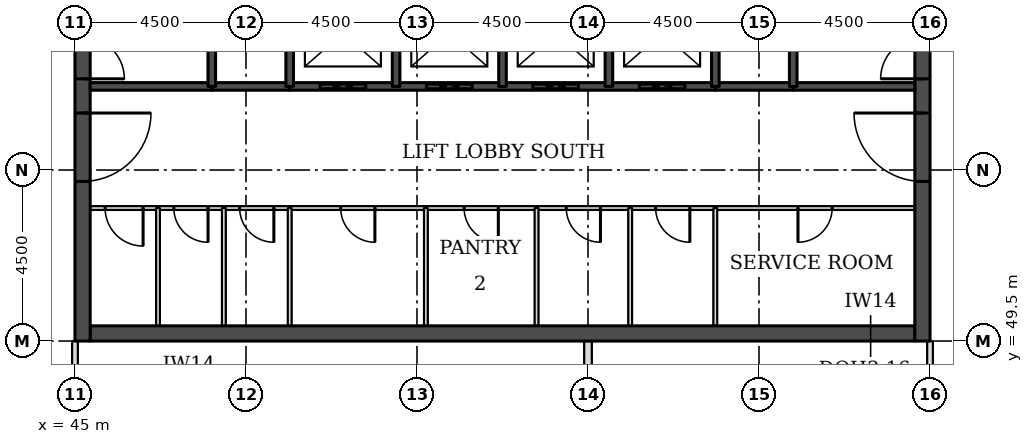
"""IFC4 building model, lengths in metres.
Left out: names, types, materials, properties, quantities, classifications, styles, units other than length and angle.
Written with IfcOpenShell. Run it as: python <this file> out.ifc"""

import sys

from ifc_helpers import new_model, si_unit, direction, frame, frame_2d, origin, place, context, subcontext, project, spatial, rectangle, extrude, element, fill, save


model = new_model("IFC4")
c1 = context("Model", 3, precision=1e-05, world=origin(), true_north=direction((0.0, 1.0)))
c2 = subcontext(c1, "Body", "Model", "MODEL_VIEW")
j1 = project(units=[si_unit("LENGTHUNIT", "METRE"), si_unit("PLANEANGLEUNIT", "RADIAN")], contexts=[c1])
p1 = place(None, origin())
s1 = spatial("IfcSite", under=j1, at=p1, CompositionType="ELEMENT")
p2 = place(p1, origin())
s2 = spatial("IfcBuilding", under=s1, at=p2, CompositionType="ELEMENT")
p3 = place(p2, frame((0.0, 0.0, 166.2)))
s3 = spatial("IfcBuildingStorey", under=s2, at=p3, CompositionType="ELEMENT", Elevation=166.2)
p4 = place(p3, frame((45.4, 49.7, 0.0), z_axis=(0.0, 0.0, 1.0), x_axis=(1.0, 0.0, 0.0)))
e1 = element("IfcWall", 1, at=p4, inside=s3, PredefinedType="SHEAR", context=c2, shape_type="SweptSolid", body=[
    extrude(rectangle(XDim=21.7, YDim=0.4, at=frame_2d((10.85, 0.0))), origin(), (0.0, 0.0, 1.0), 3.7),
])
p5 = place(p3, frame((45.2, 49.5, 0.0), z_axis=(0.0, 0.0, 1.0), x_axis=(0.0, 1.0, 0.0)))
e2 = element("IfcWall", 2, at=p5, inside=s3, PredefinedType="SHEAR", context=c2, shape_type="SweptSolid", body=[
    extrude(rectangle(XDim=22.5, YDim=0.4, at=frame_2d((11.25, 0.0))), origin(), (0.0, 0.0, 1.0), 3.7),
])
p6 = place(p5, frame((4.2, 0.0, 0.0)))
e3 = element("IfcOpeningElement", 3, at=p6, cuts=e2, PredefinedType="OPENING", context=c2, shape_type="SweptSolid", body=[
    extrude(rectangle(XDim=1.8, YDim=2.1, at=frame_2d((0.9, 1.05))), frame((0.0, 0.21, 0.0), z_axis=(0.0, -1.0, 0.0), x_axis=(1.0, 0.0, 0.0)), (0.0, 0.0, 1.0), 0.42),
])
p7 = place(p5, frame((6.9, 0.0, 0.0)))
e4 = element("IfcOpeningElement", 4, at=p7, cuts=e2, PredefinedType="OPENING", context=c2, shape_type="SweptSolid", body=[
    extrude(rectangle(XDim=1.1, YDim=2.1, at=frame_2d((0.55, 1.05))), frame((0.0, 0.21, 0.0), z_axis=(0.0, -1.0, 0.0), x_axis=(1.0, 0.0, 0.0)), (0.0, 0.0, 1.0), 0.42),
])
p8 = place(p5, frame((13.6, 0.0, 0.0)))
e5 = element("IfcOpeningElement", 5, at=p8, cuts=e2, PredefinedType="OPENING", context=c2, shape_type="SweptSolid", body=[
    extrude(rectangle(XDim=1.1, YDim=2.1, at=frame_2d((0.55, 1.05))), frame((0.0, 0.21, 0.0), z_axis=(0.0, -1.0, 0.0), x_axis=(1.0, 0.0, 0.0)), (0.0, 0.0, 1.0), 0.42),
])
p9 = place(p5, frame((16.5, 0.0, 0.0)))
e6 = element("IfcOpeningElement", 6, at=p9, cuts=e2, PredefinedType="OPENING", context=c2, shape_type="SweptSolid", body=[
    extrude(rectangle(XDim=1.8, YDim=2.1, at=frame_2d((0.9, 1.05))), frame((0.0, 0.21, 0.0), z_axis=(0.0, -1.0, 0.0), x_axis=(1.0, 0.0, 0.0)), (0.0, 0.0, 1.0), 0.42),
])
p10 = place(p3, frame((67.3, 49.5, 0.0), z_axis=(0.0, 0.0, 1.0), x_axis=(0.0, 1.0, 0.0)))
e7 = element("IfcWall", 7, at=p10, inside=s3, PredefinedType="SHEAR", context=c2, shape_type="SweptSolid", body=[
    extrude(rectangle(XDim=22.5, YDim=0.4, at=frame_2d((11.25, 0.0))), origin(), (0.0, 0.0, 1.0), 3.7),
])
p11 = place(p10, frame((4.2, 0.0, 0.0)))
e8 = element("IfcOpeningElement", 8, at=p11, cuts=e7, PredefinedType="OPENING", context=c2, shape_type="SweptSolid", body=[
    extrude(rectangle(XDim=1.8, YDim=2.1, at=frame_2d((0.9, 1.05))), frame((0.0, 0.21, 0.0), z_axis=(0.0, -1.0, 0.0), x_axis=(1.0, 0.0, 0.0)), (0.0, 0.0, 1.0), 0.42),
])
p12 = place(p10, frame((6.9, 0.0, 0.0)))
e9 = element("IfcOpeningElement", 9, at=p12, cuts=e7, PredefinedType="OPENING", context=c2, shape_type="SweptSolid", body=[
    extrude(rectangle(XDim=1.1, YDim=2.1, at=frame_2d((0.55, 1.05))), frame((0.0, 0.21, 0.0), z_axis=(0.0, -1.0, 0.0), x_axis=(1.0, 0.0, 0.0)), (0.0, 0.0, 1.0), 0.42),
])
p13 = place(p10, frame((13.6, 0.0, 0.0)))
e10 = element("IfcOpeningElement", 10, at=p13, cuts=e7, PredefinedType="OPENING", context=c2, shape_type="SweptSolid", body=[
    extrude(rectangle(XDim=1.1, YDim=2.1, at=frame_2d((0.55, 1.05))), frame((0.0, 0.21, 0.0), z_axis=(0.0, -1.0, 0.0), x_axis=(1.0, 0.0, 0.0)), (0.0, 0.0, 1.0), 0.42),
])
p14 = place(p10, frame((16.5, 0.0, 0.0)))
e11 = element("IfcOpeningElement", 11, at=p14, cuts=e7, PredefinedType="OPENING", context=c2, shape_type="SweptSolid", body=[
    extrude(rectangle(XDim=1.8, YDim=2.1, at=frame_2d((0.9, 1.05))), frame((0.0, 0.21, 0.0), z_axis=(0.0, -1.0, 0.0), x_axis=(1.0, 0.0, 0.0)), (0.0, 0.0, 1.0), 0.42),
])
p15 = place(p3, frame((58.5, 45.0, 0.0), z_axis=(0.0, 0.0, 1.0), x_axis=(0.0, 1.0, 0.0)))
e12 = element("IfcWall", 12, at=p15, inside=s3, PredefinedType="PARTITIONING", context=c2, shape_type="SweptSolid", body=[
    extrude(rectangle(XDim=4.5, YDim=0.2, at=frame_2d((2.25, 0.0))), origin(), (0.0, 0.0, 1.0), 3.55),
])
for number, where, z_axis, x_axis in (
    (13, (45.0, 48.0, 0.0), (0.0, 0.0, 1.0), (0.0, 1.0, 0.0)),
    (14, (67.5, 48.0, 0.0), (0.0, 0.0, 1.0), (0.0, 1.0, 0.0)),
):
    element("IfcWall", number, at=place(p3, frame(where, z_axis=z_axis, x_axis=x_axis)), inside=s3, PredefinedType="PARTITIONING", context=c2, shape_type="SweptSolid", body=[
        extrude(rectangle(XDim=1.5, YDim=0.15, at=frame_2d((0.75, 0.0))), origin(), (0.0, 0.0, 1.0), 3.022),
    ])
p16 = place(p3, frame((45.4, 53.0, 0.0), z_axis=(0.0, 0.0, 1.0), x_axis=(1.0, 0.0, 0.0)))
e15 = element("IfcWall", 15, at=p16, inside=s3, PredefinedType="PARTITIONING", context=c2, shape_type="SweptSolid", body=[
    extrude(rectangle(XDim=21.7, YDim=0.1, at=frame_2d((10.85, 0.0))), origin(), (0.0, 0.0, 1.0), 3.55),
])
p17 = place(p16, frame((18.625, 0.0, 0.0)))
e16 = element("IfcOpeningElement", 16, at=p17, cuts=e15, PredefinedType="OPENING", context=c2, shape_type="SweptSolid", body=[
    extrude(rectangle(XDim=0.9, YDim=2.1, at=frame_2d((0.45, 1.05))), frame((0.0, 0.06, 0.0), z_axis=(0.0, -1.0, 0.0), x_axis=(1.0, 0.0, 0.0)), (0.0, 0.0, 1.0), 0.12),
])
p18 = place(p16, frame((0.393, 0.0, 0.0)))
e17 = element("IfcOpeningElement", 17, at=p18, cuts=e15, PredefinedType="OPENING", context=c2, shape_type="SweptSolid", body=[
    extrude(rectangle(XDim=1.0, YDim=2.1, at=frame_2d((0.5, 1.05))), frame((0.0, 0.06, 0.0), z_axis=(0.0, -1.0, 0.0), x_axis=(1.0, 0.0, 0.0)), (0.0, 0.0, 1.0), 0.12),
])
p19 = place(p16, frame((2.201, 0.0, 0.0)))
e18 = element("IfcOpeningElement", 18, at=p19, cuts=e15, PredefinedType="OPENING", context=c2, shape_type="SweptSolid", body=[
    extrude(rectangle(XDim=0.9, YDim=2.1, at=frame_2d((0.45, 1.05))), frame((0.0, 0.06, 0.0), z_axis=(0.0, -1.0, 0.0), x_axis=(1.0, 0.0, 0.0)), (0.0, 0.0, 1.0), 0.12),
])
p20 = place(p16, frame((3.934, 0.0, 0.0)))
e19 = element("IfcOpeningElement", 19, at=p20, cuts=e15, PredefinedType="OPENING", context=c2, shape_type="SweptSolid", body=[
    extrude(rectangle(XDim=0.9, YDim=2.1, at=frame_2d((0.45, 1.05))), frame((0.0, 0.06, 0.0), z_axis=(0.0, -1.0, 0.0), x_axis=(1.0, 0.0, 0.0)), (0.0, 0.0, 1.0), 0.12),
])
p21 = place(p16, frame((6.592, 0.0, 0.0)))
e20 = element("IfcOpeningElement", 20, at=p21, cuts=e15, PredefinedType="OPENING", context=c2, shape_type="SweptSolid", body=[
    extrude(rectangle(XDim=0.9, YDim=2.1, at=frame_2d((0.45, 1.05))), frame((0.0, 0.06, 0.0), z_axis=(0.0, -1.0, 0.0), x_axis=(1.0, 0.0, 0.0)), (0.0, 0.0, 1.0), 0.12),
])
p22 = place(p16, frame((9.84, 0.0, 0.0)))
e21 = element("IfcOpeningElement", 21, at=p22, cuts=e15, PredefinedType="OPENING", context=c2, shape_type="SweptSolid", body=[
    extrude(rectangle(XDim=0.9, YDim=2.1, at=frame_2d((0.45, 1.05))), frame((0.0, 0.06, 0.0), z_axis=(0.0, -1.0, 0.0), x_axis=(1.0, 0.0, 0.0)), (0.0, 0.0, 1.0), 0.12),
])
p23 = place(p16, frame((12.528, 0.0, 0.0)))
e22 = element("IfcOpeningElement", 22, at=p23, cuts=e15, PredefinedType="OPENING", context=c2, shape_type="SweptSolid", body=[
    extrude(rectangle(XDim=0.9, YDim=2.1, at=frame_2d((0.45, 1.05))), frame((0.0, 0.06, 0.0), z_axis=(0.0, -1.0, 0.0), x_axis=(1.0, 0.0, 0.0)), (0.0, 0.0, 1.0), 0.12),
])
p24 = place(p16, frame((14.88, 0.0, 0.0)))
e23 = element("IfcOpeningElement", 23, at=p24, cuts=e15, PredefinedType="OPENING", context=c2, shape_type="SweptSolid", body=[
    extrude(rectangle(XDim=0.9, YDim=2.1, at=frame_2d((0.45, 1.05))), frame((0.0, 0.06, 0.0), z_axis=(0.0, -1.0, 0.0), x_axis=(1.0, 0.0, 0.0)), (0.0, 0.0, 1.0), 0.12),
])
for number, where, z_axis, x_axis in (
    (24, (48.6, 56.2, 0.0), (0.0, 0.0, 1.0), (1.0, 0.0, 0.0)),
    (25, (61.85, 56.2, 0.0), (0.0, 0.0, 1.0), (1.0, 0.0, 0.0)),
):
    element("IfcWall", number, at=place(p3, frame(where, z_axis=z_axis, x_axis=x_axis)), inside=s3, PredefinedType="SOLIDWALL", context=c2, shape_type="SweptSolid", body=[
        extrude(rectangle(XDim=2.05, YDim=0.2, at=frame_2d((1.025, 0.0))), origin(), (0.0, 0.0, 1.0), 3.55),
    ])
p25 = place(p3, frame((45.4, 56.2, 0.0), z_axis=(0.0, 0.0, 1.0), x_axis=(1.0, 0.0, 0.0)))
e26 = element("IfcWall", 26, at=p25, inside=s3, PredefinedType="SOLIDWALL", context=c2, shape_type="SweptSolid", body=[
    extrude(rectangle(XDim=3.2, YDim=0.2, at=frame_2d((1.6, 0.0))), origin(), (0.0, 0.0, 1.0), 3.55),
])
p26 = place(p3, frame((50.65, 56.2, 0.0), z_axis=(0.0, 0.0, 1.0), x_axis=(1.0, 0.0, 0.0)))
e27 = element("IfcWall", 27, at=p26, inside=s3, PredefinedType="SOLIDWALL", context=c2, shape_type="SweptSolid", body=[
    extrude(rectangle(XDim=11.2, YDim=0.2, at=frame_2d((5.6, 0.0))), origin(), (0.0, 0.0, 1.0), 3.55),
])
p27 = place(p26, frame((0.8, 0.0, 0.0)))
e28 = element("IfcOpeningElement", 28, at=p27, cuts=e27, PredefinedType="OPENING", context=c2, shape_type="SweptSolid", body=[
    extrude(rectangle(XDim=1.2, YDim=2.1, at=frame_2d((0.6, 1.05))), frame((0.0, 0.11, 0.0), z_axis=(0.0, -1.0, 0.0), x_axis=(1.0, 0.0, 0.0)), (0.0, 0.0, 1.0), 0.22),
])
p28 = place(p26, frame((3.6, 0.0, 0.0)))
e29 = element("IfcOpeningElement", 29, at=p28, cuts=e27, PredefinedType="OPENING", context=c2, shape_type="SweptSolid", body=[
    extrude(rectangle(XDim=1.2, YDim=2.1, at=frame_2d((0.6, 1.05))), frame((0.0, 0.11, 0.0), z_axis=(0.0, -1.0, 0.0), x_axis=(1.0, 0.0, 0.0)), (0.0, 0.0, 1.0), 0.22),
])
p29 = place(p26, frame((6.4, 0.0, 0.0)))
e30 = element("IfcOpeningElement", 30, at=p29, cuts=e27, PredefinedType="OPENING", context=c2, shape_type="SweptSolid", body=[
    extrude(rectangle(XDim=1.2, YDim=2.1, at=frame_2d((0.6, 1.05))), frame((0.0, 0.11, 0.0), z_axis=(0.0, -1.0, 0.0), x_axis=(1.0, 0.0, 0.0)), (0.0, 0.0, 1.0), 0.22),
])
p30 = place(p26, frame((9.2, 0.0, 0.0)))
e31 = element("IfcOpeningElement", 31, at=p30, cuts=e27, PredefinedType="OPENING", context=c2, shape_type="SweptSolid", body=[
    extrude(rectangle(XDim=1.2, YDim=2.1, at=frame_2d((0.6, 1.05))), frame((0.0, 0.11, 0.0), z_axis=(0.0, -1.0, 0.0), x_axis=(1.0, 0.0, 0.0)), (0.0, 0.0, 1.0), 0.22),
])
p31 = place(p3, frame((63.9, 56.2, 0.0), z_axis=(0.0, 0.0, 1.0), x_axis=(1.0, 0.0, 0.0)))
e32 = element("IfcWall", 32, at=p31, inside=s3, PredefinedType="SOLIDWALL", context=c2, shape_type="SweptSolid", body=[
    extrude(rectangle(XDim=3.2, YDim=0.2, at=frame_2d((1.6, 0.0))), origin(), (0.0, 0.0, 1.0), 3.55),
])
p32 = place(p3, frame((47.185, 49.9, 0.0), z_axis=(0.0, 0.0, 1.0), x_axis=(0.0, 1.0, 0.0)))
e33 = element("IfcWall", 33, at=p32, inside=s3, PredefinedType="PARTITIONING", context=c2, shape_type="SweptSolid", body=[
    extrude(rectangle(XDim=3.1, YDim=0.1, at=frame_2d((1.55, 0.0))), origin(), (0.0, 0.0, 1.0), 3.55),
])
p33 = place(p3, frame((48.6, 56.2, 0.0), z_axis=(0.0, 0.0, 1.0), x_axis=(0.0, 1.0, 0.0)))
e34 = element("IfcWall", 34, at=p33, inside=s3, PredefinedType="SOLIDWALL", context=c2, shape_type="SweptSolid", body=[
    extrude(rectangle(XDim=5.8, YDim=0.2, at=frame_2d((2.9, 0.0))), origin(), (0.0, 0.0, 1.0), 3.55),
])
for number, where, z_axis, x_axis in (
    (35, (48.917, 49.9, 0.0), (0.0, 0.0, 1.0), (0.0, 1.0, 0.0)),
    (36, (50.65, 49.9, 0.0), (0.0, 0.0, 1.0), (0.0, 1.0, 0.0)),
):
    element("IfcWall", number, at=place(p3, frame(where, z_axis=z_axis, x_axis=x_axis)), inside=s3, PredefinedType="PARTITIONING", context=c2, shape_type="SweptSolid", body=[
        extrude(rectangle(XDim=3.1, YDim=0.1, at=frame_2d((1.55, 0.0))), origin(), (0.0, 0.0, 1.0), 3.55),
    ])
for number, where, z_axis, x_axis in (
    (37, (50.65, 56.2, 0.0), (0.0, 0.0, 1.0), (0.0, 1.0, 0.0)),
    (38, (53.45, 56.2, 0.0), (0.0, 0.0, 1.0), (0.0, 1.0, 0.0)),
):
    element("IfcWall", number, at=place(p3, frame(where, z_axis=z_axis, x_axis=x_axis)), inside=s3, PredefinedType="SOLIDWALL", context=c2, shape_type="SweptSolid", body=[
        extrude(rectangle(XDim=2.8, YDim=0.2, at=frame_2d((1.4, 0.0))), origin(), (0.0, 0.0, 1.0), 3.55),
    ])
p34 = place(p3, frame((54.234, 49.9, 0.0), z_axis=(0.0, 0.0, 1.0), x_axis=(0.0, 1.0, 0.0)))
e39 = element("IfcWall", 39, at=p34, inside=s3, PredefinedType="PARTITIONING", context=c2, shape_type="SweptSolid", body=[
    extrude(rectangle(XDim=3.1, YDim=0.1, at=frame_2d((1.55, 0.0))), origin(), (0.0, 0.0, 1.0), 3.55),
])
p35 = place(p3, frame((56.25, 56.2, 0.0), z_axis=(0.0, 0.0, 1.0), x_axis=(0.0, 1.0, 0.0)))
e40 = element("IfcWall", 40, at=p35, inside=s3, PredefinedType="SOLIDWALL", context=c2, shape_type="SweptSolid", body=[
    extrude(rectangle(XDim=2.8, YDim=0.2, at=frame_2d((1.4, 0.0))), origin(), (0.0, 0.0, 1.0), 3.55),
])
p36 = place(p3, frame((57.146, 49.9, 0.0), z_axis=(0.0, 0.0, 1.0), x_axis=(0.0, 1.0, 0.0)))
e41 = element("IfcWall", 41, at=p36, inside=s3, PredefinedType="PARTITIONING", context=c2, shape_type="SweptSolid", body=[
    extrude(rectangle(XDim=3.1, YDim=0.1, at=frame_2d((1.55, 0.0))), origin(), (0.0, 0.0, 1.0), 3.55),
])
p37 = place(p3, frame((59.05, 56.2, 0.0), z_axis=(0.0, 0.0, 1.0), x_axis=(0.0, 1.0, 0.0)))
e42 = element("IfcWall", 42, at=p37, inside=s3, PredefinedType="SOLIDWALL", context=c2, shape_type="SweptSolid", body=[
    extrude(rectangle(XDim=2.8, YDim=0.2, at=frame_2d((1.4, 0.0))), origin(), (0.0, 0.0, 1.0), 3.55),
])
for number, where, z_axis, x_axis in (
    (43, (59.61, 49.9, 0.0), (0.0, 0.0, 1.0), (0.0, 1.0, 0.0)),
    (44, (61.85, 49.9, 0.0), (0.0, 0.0, 1.0), (0.0, 1.0, 0.0)),
):
    element("IfcWall", number, at=place(p3, frame(where, z_axis=z_axis, x_axis=x_axis)), inside=s3, PredefinedType="PARTITIONING", context=c2, shape_type="SweptSolid", body=[
        extrude(rectangle(XDim=3.1, YDim=0.1, at=frame_2d((1.55, 0.0))), origin(), (0.0, 0.0, 1.0), 3.55),
    ])
p38 = place(p3, frame((61.85, 56.2, 0.0), z_axis=(0.0, 0.0, 1.0), x_axis=(0.0, 1.0, 0.0)))
e45 = element("IfcWall", 45, at=p38, inside=s3, PredefinedType="SOLIDWALL", context=c2, shape_type="SweptSolid", body=[
    extrude(rectangle(XDim=2.8, YDim=0.2, at=frame_2d((1.4, 0.0))), origin(), (0.0, 0.0, 1.0), 3.55),
])
p39 = place(p3, frame((63.9, 56.2, 0.0), z_axis=(0.0, 0.0, 1.0), x_axis=(0.0, 1.0, 0.0)))
e46 = element("IfcWall", 46, at=p39, inside=s3, PredefinedType="SOLIDWALL", context=c2, shape_type="SweptSolid", body=[
    extrude(rectangle(XDim=5.8, YDim=0.2, at=frame_2d((2.9, 0.0))), origin(), (0.0, 0.0, 1.0), 3.55),
])
p40 = place(p27, origin())
e47 = element("IfcDoor", 47, at=p40, inside=s3, OperationType="DOUBLE_DOOR_SLIDING", PredefinedType="DOOR", context=c2, shape_type="SweptSolid", body=[
    extrude(rectangle(XDim=1.2, YDim=2.1, at=frame_2d((0.6, 1.05))), frame((0.0, 0.025, 0.0), z_axis=(0.0, -1.0, 0.0), x_axis=(1.0, 0.0, 0.0)), (0.0, 0.0, 1.0), 0.05),
])
fill(e28, e47)
p41 = place(p28, origin())
e48 = element("IfcDoor", 48, at=p41, inside=s3, OperationType="DOUBLE_DOOR_SLIDING", PredefinedType="DOOR", context=c2, shape_type="SweptSolid", body=[
    extrude(rectangle(XDim=1.2, YDim=2.1, at=frame_2d((0.6, 1.05))), frame((0.0, 0.025, 0.0), z_axis=(0.0, -1.0, 0.0), x_axis=(1.0, 0.0, 0.0)), (0.0, 0.0, 1.0), 0.05),
])
fill(e29, e48)
p42 = place(p29, origin())
e49 = element("IfcDoor", 49, at=p42, inside=s3, OperationType="DOUBLE_DOOR_SLIDING", PredefinedType="DOOR", context=c2, shape_type="SweptSolid", body=[
    extrude(rectangle(XDim=1.2, YDim=2.1, at=frame_2d((0.6, 1.05))), frame((0.0, 0.025, 0.0), z_axis=(0.0, -1.0, 0.0), x_axis=(1.0, 0.0, 0.0)), (0.0, 0.0, 1.0), 0.05),
])
fill(e30, e49)
p43 = place(p30, origin())
e50 = element("IfcDoor", 50, at=p43, inside=s3, OperationType="DOUBLE_DOOR_SLIDING", PredefinedType="DOOR", context=c2, shape_type="SweptSolid", body=[
    extrude(rectangle(XDim=1.2, YDim=2.1, at=frame_2d((0.6, 1.05))), frame((0.0, 0.025, 0.0), z_axis=(0.0, -1.0, 0.0), x_axis=(1.0, 0.0, 0.0)), (0.0, 0.0, 1.0), 0.05),
])
fill(e31, e50)
p44 = place(p6, frame((1.8, 0.0, 0.0), z_axis=(0.0, 0.0, 1.0), x_axis=(-1.0, 0.0, 0.0)))
e51 = element("IfcDoor", 51, at=p44, inside=s3, OperationType="SINGLE_SWING_LEFT", PredefinedType="DOOR", context=c2, shape_type="SweptSolid", body=[
    extrude(rectangle(XDim=1.8, YDim=2.1, at=frame_2d((0.9, 1.05))), frame((0.0, 0.025, 0.0), z_axis=(0.0, -1.0, 0.0), x_axis=(1.0, 0.0, 0.0)), (0.0, 0.0, 1.0), 0.05),
])
fill(e3, e51)
p45 = place(p7, frame((1.1, 0.0, 0.0), z_axis=(0.0, 0.0, 1.0), x_axis=(-1.0, 0.0, 0.0)))
e52 = element("IfcDoor", 52, at=p45, inside=s3, OperationType="SINGLE_SWING_RIGHT", PredefinedType="DOOR", context=c2, shape_type="SweptSolid", body=[
    extrude(rectangle(XDim=1.1, YDim=2.1, at=frame_2d((0.55, 1.05))), frame((0.0, 0.025, 0.0), z_axis=(0.0, -1.0, 0.0), x_axis=(1.0, 0.0, 0.0)), (0.0, 0.0, 1.0), 0.05),
])
fill(e4, e52)
p46 = place(p11, origin())
e53 = element("IfcDoor", 53, at=p46, inside=s3, OperationType="SINGLE_SWING_RIGHT", PredefinedType="DOOR", context=c2, shape_type="SweptSolid", body=[
    extrude(rectangle(XDim=1.8, YDim=2.1, at=frame_2d((0.9, 1.05))), frame((0.0, 0.025, 0.0), z_axis=(0.0, -1.0, 0.0), x_axis=(1.0, 0.0, 0.0)), (0.0, 0.0, 1.0), 0.05),
])
fill(e8, e53)
p47 = place(p12, origin())
e54 = element("IfcDoor", 54, at=p47, inside=s3, OperationType="SINGLE_SWING_LEFT", PredefinedType="DOOR", context=c2, shape_type="SweptSolid", body=[
    extrude(rectangle(XDim=1.1, YDim=2.1, at=frame_2d((0.55, 1.05))), frame((0.0, 0.025, 0.0), z_axis=(0.0, -1.0, 0.0), x_axis=(1.0, 0.0, 0.0)), (0.0, 0.0, 1.0), 0.05),
])
fill(e9, e54)
p48 = place(p17, frame((0.9, 0.0, 0.0), z_axis=(0.0, 0.0, 1.0), x_axis=(-1.0, 0.0, 0.0)))
e55 = element("IfcDoor", 55, at=p48, inside=s3, OperationType="SINGLE_SWING_RIGHT", PredefinedType="DOOR", context=c2, shape_type="SweptSolid", body=[
    extrude(rectangle(XDim=0.9, YDim=2.1, at=frame_2d((0.45, 1.05))), frame((0.0, 0.025, 0.0), z_axis=(0.0, -1.0, 0.0), x_axis=(1.0, 0.0, 0.0)), (0.0, 0.0, 1.0), 0.05),
])
fill(e16, e55)
p49 = place(p18, frame((1.0, 0.0, 0.0), z_axis=(0.0, 0.0, 1.0), x_axis=(-1.0, 0.0, 0.0)))
e56 = element("IfcDoor", 56, at=p49, inside=s3, OperationType="SINGLE_SWING_LEFT", PredefinedType="DOOR", context=c2, shape_type="SweptSolid", body=[
    extrude(rectangle(XDim=1.0, YDim=2.1, at=frame_2d((0.5, 1.05))), frame((0.0, 0.025, 0.0), z_axis=(0.0, -1.0, 0.0), x_axis=(1.0, 0.0, 0.0)), (0.0, 0.0, 1.0), 0.05),
])
fill(e17, e56)
p50 = place(p19, frame((0.9, 0.0, 0.0), z_axis=(0.0, 0.0, 1.0), x_axis=(-1.0, 0.0, 0.0)))
e57 = element("IfcDoor", 57, at=p50, inside=s3, OperationType="SINGLE_SWING_LEFT", PredefinedType="DOOR", context=c2, shape_type="SweptSolid", body=[
    extrude(rectangle(XDim=0.9, YDim=2.1, at=frame_2d((0.45, 1.05))), frame((0.0, 0.025, 0.0), z_axis=(0.0, -1.0, 0.0), x_axis=(1.0, 0.0, 0.0)), (0.0, 0.0, 1.0), 0.05),
])
fill(e18, e57)
p51 = place(p20, frame((0.9, 0.0, 0.0), z_axis=(0.0, 0.0, 1.0), x_axis=(-1.0, 0.0, 0.0)))
e58 = element("IfcDoor", 58, at=p51, inside=s3, OperationType="SINGLE_SWING_LEFT", PredefinedType="DOOR", context=c2, shape_type="SweptSolid", body=[
    extrude(rectangle(XDim=0.9, YDim=2.1, at=frame_2d((0.45, 1.05))), frame((0.0, 0.025, 0.0), z_axis=(0.0, -1.0, 0.0), x_axis=(1.0, 0.0, 0.0)), (0.0, 0.0, 1.0), 0.05),
])
fill(e19, e58)
p52 = place(p21, frame((0.9, 0.0, 0.0), z_axis=(0.0, 0.0, 1.0), x_axis=(-1.0, 0.0, 0.0)))
e59 = element("IfcDoor", 59, at=p52, inside=s3, OperationType="SINGLE_SWING_LEFT", PredefinedType="DOOR", context=c2, shape_type="SweptSolid", body=[
    extrude(rectangle(XDim=0.9, YDim=2.1, at=frame_2d((0.45, 1.05))), frame((0.0, 0.025, 0.0), z_axis=(0.0, -1.0, 0.0), x_axis=(1.0, 0.0, 0.0)), (0.0, 0.0, 1.0), 0.05),
])
fill(e20, e59)
p53 = place(p22, frame((0.9, 0.0, 0.0), z_axis=(0.0, 0.0, 1.0), x_axis=(-1.0, 0.0, 0.0)))
e60 = element("IfcDoor", 60, at=p53, inside=s3, OperationType="SINGLE_SWING_LEFT", PredefinedType="DOOR", context=c2, shape_type="SweptSolid", body=[
    extrude(rectangle(XDim=0.9, YDim=2.1, at=frame_2d((0.45, 1.05))), frame((0.0, 0.025, 0.0), z_axis=(0.0, -1.0, 0.0), x_axis=(1.0, 0.0, 0.0)), (0.0, 0.0, 1.0), 0.05),
])
fill(e21, e60)
p54 = place(p23, frame((0.9, 0.0, 0.0), z_axis=(0.0, 0.0, 1.0), x_axis=(-1.0, 0.0, 0.0)))
e61 = element("IfcDoor", 61, at=p54, inside=s3, OperationType="SINGLE_SWING_LEFT", PredefinedType="DOOR", context=c2, shape_type="SweptSolid", body=[
    extrude(rectangle(XDim=0.9, YDim=2.1, at=frame_2d((0.45, 1.05))), frame((0.0, 0.025, 0.0), z_axis=(0.0, -1.0, 0.0), x_axis=(1.0, 0.0, 0.0)), (0.0, 0.0, 1.0), 0.05),
])
fill(e22, e61)
p55 = place(p24, frame((0.9, 0.0, 0.0), z_axis=(0.0, 0.0, 1.0), x_axis=(-1.0, 0.0, 0.0)))
e62 = element("IfcDoor", 62, at=p55, inside=s3, OperationType="SINGLE_SWING_LEFT", PredefinedType="DOOR", context=c2, shape_type="SweptSolid", body=[
    extrude(rectangle(XDim=0.9, YDim=2.1, at=frame_2d((0.45, 1.05))), frame((0.0, 0.025, 0.0), z_axis=(0.0, -1.0, 0.0), x_axis=(1.0, 0.0, 0.0)), (0.0, 0.0, 1.0), 0.05),
])
fill(e23, e62)
save(model, sys.argv[1])
